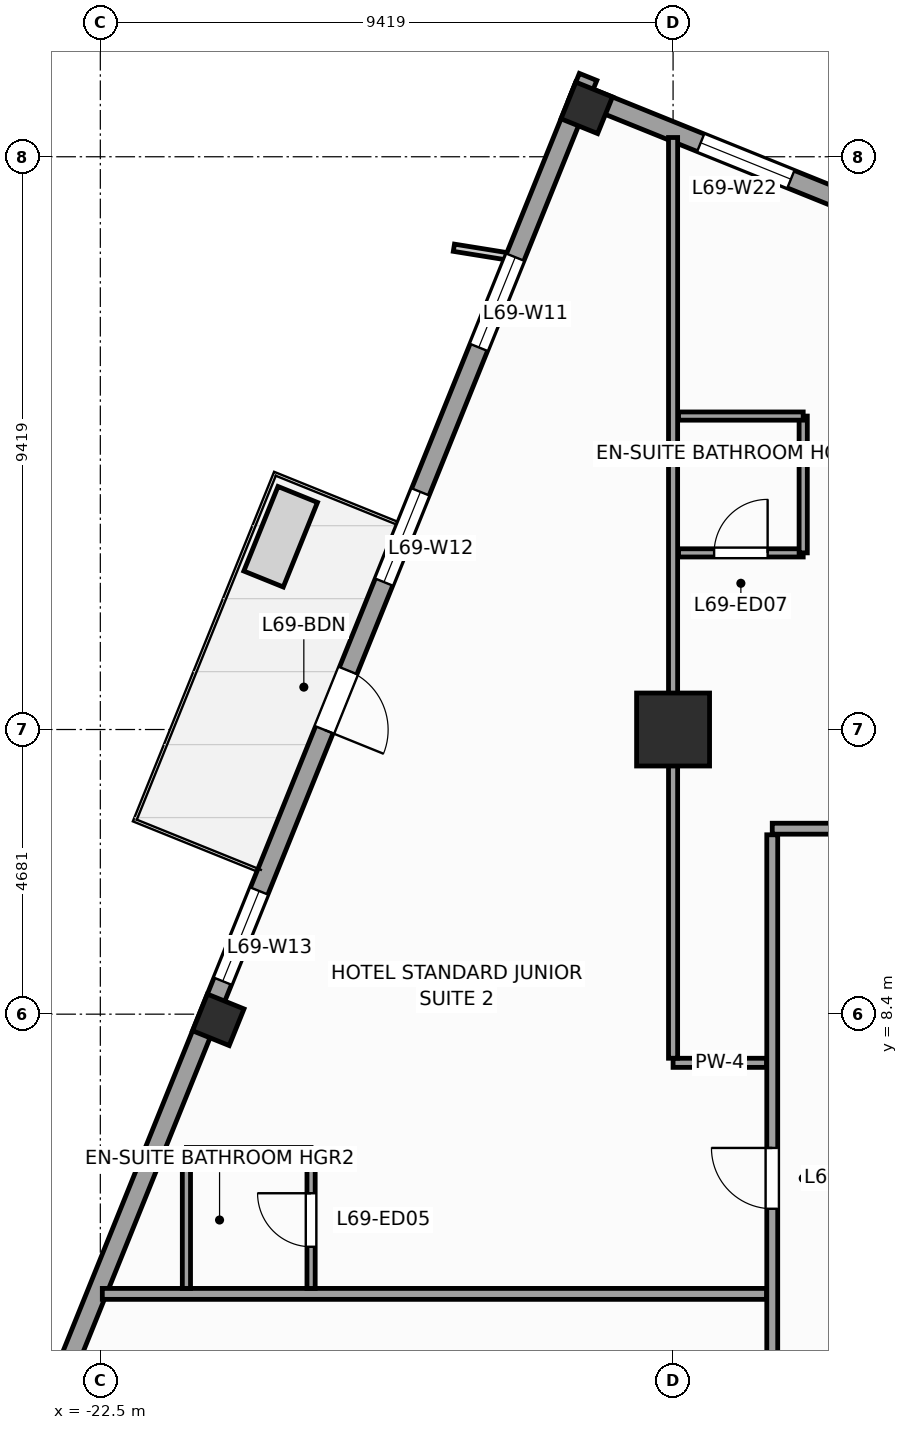
"""IFC4 building model, lengths in metres.
Left out: names, types, materials, properties, quantities, classifications, styles, units other than length and angle.
Written with IfcOpenShell. Run it as: python <this file> out.ifc"""

import sys

from ifc_helpers import new_model, si_unit, direction, frame, frame_2d, origin, origin_2d, place, context, subcontext, project, spatial, rectangle, extrude, source, transform, mapped, element, fill, save


model = new_model("IFC4")
c1 = context("Model", 3, precision=1e-05, world=origin(), true_north=direction((0.0, 1.0)))
c2 = subcontext(c1, "Body", "Model", "MODEL_VIEW")
j1 = project(units=[si_unit("LENGTHUNIT", "METRE"), si_unit("PLANEANGLEUNIT", "RADIAN")], contexts=[c1])
p1 = place(None, origin())
s1 = spatial("IfcSite", under=j1, at=p1, CompositionType="ELEMENT")
p2 = place(p1, origin())
s2 = spatial("IfcBuilding", under=s1, at=p2, CompositionType="ELEMENT")
p3 = place(p2, frame((0.0, 0.0, 283.2)))
s3 = spatial("IfcBuildingStorey", under=s2, at=p3, CompositionType="ELEMENT", Elevation=283.2)
m1 = source(origin(), c2, "Body", "SweptSolid", [
    extrude(rectangle(XDim=1.2, YDim=1.2, at=origin_2d()), origin(), (0.0, 0.0, 1.0), 3.6),
])
p4 = place(p3, frame((-13.081, 13.081, 0.0), z_axis=(0.0, 0.0, 1.0), x_axis=(1.0, 0.0, 0.0)))
e1 = element("IfcColumn", 1, at=p4, inside=s3, PredefinedType="COLUMN", context=c2, shape_type="MappedRepresentation", body=[
    mapped(m1, transform((0.0, 0.0, 0.0), scale=1.0)),
])
m2 = source(origin(), c2, "Body", "SweptSolid", [
    extrude(rectangle(XDim=0.65, YDim=0.65, at=origin_2d()), origin(), (0.0, 0.0, 1.0), 3.6),
])
for number, where, z_axis, x_axis in (
    (2, (-14.501, 23.304, 0.0), (0.0, 0.0, 1.0), (0.375, 0.927, 0.0)),
    (3, (-20.56, 8.307, 0.0), (0.0, 0.0, 1.0), (0.375, 0.927, 0.0)),
):
    element("IfcColumn", number, at=place(p3, frame(where, z_axis=z_axis, x_axis=x_axis)), inside=s3, PredefinedType="COLUMN", context=c2, shape_type="MappedRepresentation", body=[
        mapped(m2, transform((0.0, 0.0, 0.0), scale=1.0)),
    ])
p5 = place(p3, frame((-9.032, 21.278, 0.0), z_axis=(0.0, 0.0, 1.0), x_axis=(-0.927185411764, 0.374602739196, 0.0)))
e4 = element("IfcWall", 4, at=p5, inside=s3, PredefinedType="STANDARD", context=c2, shape_type="SweptSolid", body=[
    extrude(rectangle(XDim=6.155, YDim=0.31, at=frame_2d((3.078, 0.0))), origin(), (0.0, 0.0, 1.0), 3.35),
])
p6 = place(p5, frame((2.278, 0.0, 0.47)))
e5 = element("IfcOpeningElement", 5, at=p6, cuts=e4, PredefinedType="OPENING", context=c2, shape_type="SweptSolid", body=[
    extrude(rectangle(XDim=1.6, YDim=2.1, at=frame_2d((0.8, 1.05))), frame((0.0, 0.165, 0.0), z_axis=(0.0, -1.0, 0.0), x_axis=(1.0, 0.0, 0.0)), (0.0, 0.0, 1.0), 0.33),
])
p7 = place(p3, frame((-14.479, 23.813, 0.0), z_axis=(0.0, 0.0, 1.0), x_axis=(-0.374609557019, -0.927182657188, 0.0)))
e6 = element("IfcWall", 6, at=p7, inside=s3, PredefinedType="STANDARD", context=c2, shape_type="SweptSolid", body=[
    extrude(rectangle(XDim=33.31, YDim=0.31, at=frame_2d((16.655, 0.0))), origin(), (0.0, 0.0, 1.0), 2.75),
])
p8 = place(p7, frame((10.53, 0.0, 0.0)))
e7 = element("IfcOpeningElement", 7, at=p8, cuts=e6, PredefinedType="OPENING", context=c2, shape_type="SweptSolid", body=[
    extrude(rectangle(XDim=1.05, YDim=2.25, at=frame_2d((0.525, 1.125))), frame((0.0, 0.165, 0.0), z_axis=(0.0, -1.0, 0.0), x_axis=(1.0, 0.0, 0.0)), (0.0, 0.0, 1.0), 0.33),
])
p9 = place(p7, frame((3.197, 0.0, 0.47)))
e8 = element("IfcOpeningElement", 8, at=p9, cuts=e6, PredefinedType="OPENING", context=c2, shape_type="SweptSolid", body=[
    extrude(rectangle(XDim=1.6, YDim=2.1, at=frame_2d((0.8, 1.05))), frame((0.0, 0.165, 0.0), z_axis=(0.0, -1.0, 0.0), x_axis=(1.0, 0.0, 0.0)), (0.0, 0.0, 1.0), 0.33),
])
p10 = place(p7, frame((7.36, 0.0, 0.47)))
e9 = element("IfcOpeningElement", 9, at=p10, cuts=e6, PredefinedType="OPENING", context=c2, shape_type="SweptSolid", body=[
    extrude(rectangle(XDim=1.6, YDim=2.1, at=frame_2d((0.8, 1.05))), frame((0.0, 0.165, 0.0), z_axis=(0.0, -1.0, 0.0), x_axis=(1.0, 0.0, 0.0)), (0.0, 0.0, 1.0), 0.33),
])
p11 = place(p7, frame((14.439, 0.0, 0.47)))
e10 = element("IfcOpeningElement", 10, at=p11, cuts=e6, PredefinedType="OPENING", context=c2, shape_type="SweptSolid", body=[
    extrude(rectangle(XDim=1.6, YDim=2.1, at=frame_2d((0.8, 1.05))), frame((0.0, 0.165, 0.0), z_axis=(0.0, -1.0, 0.0), x_axis=(1.0, 0.0, 0.0)), (0.0, 0.0, 1.0), 0.33),
])
p12 = place(p7, frame((23.351, 0.0, 0.47)))
e11 = element("IfcOpeningElement", 11, at=p12, cuts=e6, PredefinedType="OPENING", context=c2, shape_type="SweptSolid", body=[
    extrude(rectangle(XDim=1.6, YDim=2.1, at=frame_2d((0.8, 1.05))), frame((0.0, 0.165, 0.0), z_axis=(0.0, -1.0, 0.0), x_axis=(1.0, 0.0, 0.0)), (0.0, 0.0, 1.0), 0.33),
])
p13 = place(p7, frame((30.097, 0.0, 0.47)))
e12 = element("IfcOpeningElement", 12, at=p13, cuts=e6, PredefinedType="OPENING", context=c2, shape_type="SweptSolid", body=[
    extrude(rectangle(XDim=1.6, YDim=2.1, at=frame_2d((0.8, 1.05))), frame((0.0, 0.165, 0.0), z_axis=(0.0, -1.0, 0.0), x_axis=(1.0, 0.0, 0.0)), (0.0, 0.0, 1.0), 0.33),
])
p14 = place(p7, frame((27.59, 0.0, 0.47)))
e13 = element("IfcOpeningElement", 13, at=p14, cuts=e6, PredefinedType="OPENING", context=c2, shape_type="SweptSolid", body=[
    extrude(rectangle(XDim=1.6, YDim=2.1, at=frame_2d((0.8, 1.05))), frame((0.0, 0.165, 0.0), z_axis=(0.0, -1.0, 0.0), x_axis=(1.0, 0.0, 0.0)), (0.0, 0.0, 1.0), 0.33),
])
p15 = place(p3, frame((-11.45, 11.45, 0.0), z_axis=(0.0, 0.0, 1.0), x_axis=(1.0, 0.0, 0.0)))
e14 = element("IfcWall", 14, at=p15, inside=s3, PredefinedType="PARTITIONING", context=c2, shape_type="SweptSolid", body=[
    extrude(rectangle(XDim=21.75, YDim=0.18, at=frame_2d((10.875, 0.0))), origin(), (0.0, 0.0, 1.0), 3.35),
])
p16 = place(p15, frame((2.639, 0.0, 0.0)))
e15 = element("IfcOpeningElement", 15, at=p16, cuts=e14, PredefinedType="OPENING", context=c2, shape_type="SweptSolid", body=[
    extrude(rectangle(XDim=1.0, YDim=2.15, at=frame_2d((0.5, 1.075))), frame((0.0, 0.1, 0.0), z_axis=(0.0, -1.0, 0.0), x_axis=(1.0, 0.0, 0.0)), (0.0, 0.0, 1.0), 0.2),
])
p17 = place(p15, frame((7.8, 0.0, 0.0)))
e16 = element("IfcOpeningElement", 16, at=p17, cuts=e14, PredefinedType="OPENING", context=c2, shape_type="SweptSolid", body=[
    extrude(rectangle(XDim=1.0, YDim=2.15, at=frame_2d((0.5, 1.075))), frame((0.0, 0.1, 0.0), z_axis=(0.0, -1.0, 0.0), x_axis=(1.0, 0.0, 0.0)), (0.0, 0.0, 1.0), 0.2),
])
p18 = place(p15, frame((12.65, 0.0, 0.0)))
e17 = element("IfcOpeningElement", 17, at=p18, cuts=e14, PredefinedType="OPENING", context=c2, shape_type="SweptSolid", body=[
    extrude(rectangle(XDim=1.0, YDim=2.15, at=frame_2d((0.5, 1.075))), frame((0.0, 0.1, 0.0), z_axis=(0.0, -1.0, 0.0), x_axis=(1.0, 0.0, 0.0)), (0.0, 0.0, 1.0), 0.2),
])
p19 = place(p15, frame((18.036, 0.0, 0.0)))
e18 = element("IfcOpeningElement", 18, at=p19, cuts=e14, PredefinedType="OPENING", context=c2, shape_type="SweptSolid", body=[
    extrude(rectangle(XDim=1.0, YDim=2.15, at=frame_2d((0.5, 1.075))), frame((0.0, 0.1, 0.0), z_axis=(0.0, -1.0, 0.0), x_axis=(1.0, 0.0, 0.0)), (0.0, 0.0, 1.0), 0.2),
])
p20 = place(p3, frame((-11.45, -12.35, 0.0), z_axis=(0.0, 0.0, 1.0), x_axis=(0.0, 1.0, 0.0)))
e19 = element("IfcWall", 19, at=p20, inside=s3, PredefinedType="PARTITIONING", context=c2, shape_type="SweptSolid", body=[
    extrude(rectangle(XDim=23.7, YDim=0.18, at=frame_2d((11.85, 0.0))), origin(), (0.0, 0.0, 1.0), 3.35),
])
p21 = place(p20, frame((13.75, 0.0, 0.0)))
e20 = element("IfcOpeningElement", 20, at=p21, cuts=e19, PredefinedType="OPENING", context=c2, shape_type="SweptSolid", body=[
    extrude(rectangle(XDim=1.0, YDim=2.15, at=frame_2d((0.5, 1.075))), frame((0.0, 0.1, 0.0), z_axis=(0.0, -1.0, 0.0), x_axis=(1.0, 0.0, 0.0)), (0.0, 0.0, 1.0), 0.2),
])
p22 = place(p20, frame((17.55, 0.0, 0.0)))
e21 = element("IfcOpeningElement", 21, at=p22, cuts=e19, PredefinedType="OPENING", context=c2, shape_type="SweptSolid", body=[
    extrude(rectangle(XDim=1.0, YDim=2.15, at=frame_2d((0.5, 1.075))), frame((0.0, 0.1, 0.0), z_axis=(0.0, -1.0, 0.0), x_axis=(1.0, 0.0, 0.0)), (0.0, 0.0, 1.0), 0.2),
])
p23 = place(p20, frame((6.15, 0.0, 0.0)))
e22 = element("IfcOpeningElement", 22, at=p23, cuts=e19, PredefinedType="OPENING", context=c2, shape_type="SweptSolid", body=[
    extrude(rectangle(XDim=1.0, YDim=2.15, at=frame_2d((0.5, 1.075))), frame((0.0, 0.1, 0.0), z_axis=(0.0, -1.0, 0.0), x_axis=(1.0, 0.0, 0.0)), (0.0, 0.0, 1.0), 0.2),
])
p24 = place(p20, frame((9.95, 0.0, 0.0)))
e23 = element("IfcOpeningElement", 23, at=p24, cuts=e19, PredefinedType="OPENING", context=c2, shape_type="SweptSolid", body=[
    extrude(rectangle(XDim=1.0, YDim=2.15, at=frame_2d((0.5, 1.075))), frame((0.0, 0.1, 0.0), z_axis=(0.0, -1.0, 0.0), x_axis=(1.0, 0.0, 0.0)), (0.0, 0.0, 1.0), 0.2),
])
p25 = place(p3, frame((-11.545, 3.8, 0.0), z_axis=(0.0, 0.0, 1.0), x_axis=(-1.0, 0.0, 0.0)))
e24 = element("IfcWall", 24, at=p25, inside=s3, PredefinedType="PARTITIONING", context=c2, shape_type="SweptSolid", body=[
    extrude(rectangle(XDim=10.923, YDim=0.18, at=frame_2d((5.461, 0.0))), origin(), (0.0, 0.0, 1.0), 3.35),
])
p26 = place(p3, frame((-11.545, 7.6, 0.0), z_axis=(0.0, 0.0, 1.0), x_axis=(-1.0, 0.0, 0.0)))
e25 = element("IfcWall", 25, at=p26, inside=s3, PredefinedType="PARTITIONING", context=c2, shape_type="SweptSolid", body=[
    extrude(rectangle(XDim=1.536, YDim=0.15, at=frame_2d((0.768, 0.0))), origin(), (0.0, 0.0, 1.0), 3.35),
])
p27 = place(p3, frame((-13.081, 7.675, 0.0), z_axis=(0.0, 0.0, 1.0), x_axis=(0.0, 1.0, 0.0)))
e26 = element("IfcWall", 26, at=p27, inside=s3, PredefinedType="PARTITIONING", context=c2, shape_type="SweptSolid", body=[
    extrude(rectangle(XDim=15.142, YDim=0.15, at=frame_2d((7.571, 0.0))), origin(), (0.0, 0.0, 1.0), 2.45),
])
p28 = place(p3, frame((-19.034, 3.89, 0.0), z_axis=(0.0, 0.0, 1.0), x_axis=(0.0, 1.0, 0.0)))
e27 = element("IfcWall", 27, at=p28, inside=s3, PredefinedType="PARTITIONING", context=c2, shape_type="SweptSolid", body=[
    extrude(rectangle(XDim=2.25, YDim=0.135, at=frame_2d((1.125, 0.0))), origin(), (0.0, 0.0, 1.0), 3.35),
])
p29 = place(p28, frame((0.685, 0.0, 0.0)))
e28 = element("IfcOpeningElement", 28, at=p29, cuts=e27, PredefinedType="OPENING", context=c2, shape_type="SweptSolid", body=[
    extrude(rectangle(XDim=0.88, YDim=2.1, at=frame_2d((0.44, 1.05))), frame((0.0, 0.078, 0.0), z_axis=(0.0, -1.0, 0.0), x_axis=(1.0, 0.0, 0.0)), (0.0, 0.0, 1.0), 0.155),
])
p30 = place(p3, frame((-21.084, 6.14, 0.0), z_axis=(0.0, 0.0, 1.0), x_axis=(1.0, 0.0, 0.0)))
e29 = element("IfcWall", 29, at=p30, inside=s3, PredefinedType="PARTITIONING", context=c2, shape_type="SweptSolid", body=[
    extrude(rectangle(XDim=2.05, YDim=0.135, at=frame_2d((1.025, 0.0))), origin(), (0.0, 0.0, 1.0), 3.35),
])
p31 = place(p3, frame((-21.084, 3.89, 0.0), z_axis=(0.0, 0.0, 1.0), x_axis=(0.0, 1.0, 0.0)))
e30 = element("IfcWall", 30, at=p31, inside=s3, PredefinedType="PARTITIONING", context=c2, shape_type="SweptSolid", body=[
    extrude(rectangle(XDim=2.25, YDim=0.135, at=frame_2d((1.125, 0.0))), origin(), (0.0, 0.0, 1.0), 3.35),
])
p32 = place(p3, frame((-12.991, 15.986, 0.0), z_axis=(0.0, 0.0, 1.0), x_axis=(1.0, 0.0, 0.0)))
e31 = element("IfcWall", 31, at=p32, inside=s3, PredefinedType="PARTITIONING", context=c2, shape_type="SweptSolid", body=[
    extrude(rectangle(XDim=2.05, YDim=0.135, at=frame_2d((1.025, 0.0))), origin(), (0.0, 0.0, 1.0), 3.35),
])
p33 = place(p32, frame((0.585, 0.0, 0.0)))
e32 = element("IfcOpeningElement", 32, at=p33, cuts=e31, PredefinedType="OPENING", context=c2, shape_type="SweptSolid", body=[
    extrude(rectangle(XDim=0.88, YDim=2.1, at=frame_2d((0.44, 1.05))), frame((0.0, 0.078, 0.0), z_axis=(0.0, -1.0, 0.0), x_axis=(1.0, 0.0, 0.0)), (0.0, 0.0, 1.0), 0.155),
])
p34 = place(p3, frame((-10.941, 15.986, 0.0), z_axis=(0.0, 0.0, 1.0), x_axis=(0.0, 1.0, 0.0)))
e33 = element("IfcWall", 33, at=p34, inside=s3, PredefinedType="PARTITIONING", context=c2, shape_type="SweptSolid", body=[
    extrude(rectangle(XDim=2.25, YDim=0.135, at=frame_2d((1.125, 0.0))), origin(), (0.0, 0.0, 1.0), 3.35),
])
p35 = place(p3, frame((-12.991, 18.236, 0.0), z_axis=(0.0, 0.0, 1.0), x_axis=(1.0, 0.0, 0.0)))
e34 = element("IfcWall", 34, at=p35, inside=s3, PredefinedType="PARTITIONING", context=c2, shape_type="SweptSolid", body=[
    extrude(rectangle(XDim=2.05, YDim=0.135, at=frame_2d((1.025, 0.0))), origin(), (0.0, 0.0, 1.0), 3.35),
])
m3 = source(origin(), c2, "Body", "SweptSolid", [
    extrude(rectangle(XDim=1.05, YDim=2.25, at=frame_2d((0.525, 1.125))), frame((0.0, 0.025, 0.0), z_axis=(0.0, -1.0, 0.0), x_axis=(1.0, 0.0, 0.0)), (0.0, 0.0, 1.0), 0.05),
])
p36 = place(p8, origin())
e35 = element("IfcDoor", 35, at=p36, inside=s3, OperationType="SINGLE_SWING_RIGHT", PredefinedType="DOOR", context=c2, shape_type="MappedRepresentation", body=[
    mapped(m3, transform((0.0, 0.0, 0.0), scale=1.0)),
])
fill(e7, e35)
m4 = source(origin(), c2, "Body", "SweptSolid", [
    extrude(rectangle(XDim=1.6, YDim=2.1, at=frame_2d((0.8, 1.05))), frame((0.0, 0.03, 0.0), z_axis=(0.0, -1.0, 0.0), x_axis=(1.0, 0.0, 0.0)), (0.0, 0.0, 1.0), 0.06),
])
p37 = place(p9, origin())
e36 = element("IfcWindow", 36, at=p37, inside=s3, PartitioningType="SINGLE_PANEL", PredefinedType="WINDOW", context=c2, shape_type="MappedRepresentation", body=[
    mapped(m4, transform((0.0, 0.0, 0.0), scale=1.0)),
])
fill(e8, e36)
p38 = place(p10, origin())
e37 = element("IfcWindow", 37, at=p38, inside=s3, PartitioningType="SINGLE_PANEL", PredefinedType="WINDOW", context=c2, shape_type="MappedRepresentation", body=[
    mapped(m4, transform((0.0, 0.0, 0.0), scale=1.0)),
])
fill(e9, e37)
p39 = place(p11, origin())
e38 = element("IfcWindow", 38, at=p39, inside=s3, PartitioningType="SINGLE_PANEL", PredefinedType="WINDOW", context=c2, shape_type="MappedRepresentation", body=[
    mapped(m4, transform((0.0, 0.0, 0.0), scale=1.0)),
])
fill(e10, e38)
p40 = place(p6, origin())
e39 = element("IfcWindow", 39, at=p40, inside=s3, PartitioningType="SINGLE_PANEL", PredefinedType="WINDOW", context=c2, shape_type="MappedRepresentation", body=[
    mapped(m4, transform((0.0, 0.0, 0.0), scale=1.0)),
])
fill(e5, e39)
m5 = source(origin(), c2, "Body", "SweptSolid", [
    extrude(rectangle(XDim=1.0, YDim=2.15, at=frame_2d((0.5, 1.075))), frame((0.0, 0.025, 0.0), z_axis=(0.0, -1.0, 0.0), x_axis=(1.0, 0.0, 0.0)), (0.0, 0.0, 1.0), 0.05),
])
p41 = place(p22, origin())
e40 = element("IfcDoor", 40, at=p41, inside=s3, OperationType="SINGLE_SWING_RIGHT", PredefinedType="DOOR", context=c2, shape_type="MappedRepresentation", body=[
    mapped(m5, transform((0.0, 0.0, 0.0), scale=1.0)),
])
fill(e21, e40)
m6 = source(origin(), c2, "Body", "SweptSolid", [
    extrude(rectangle(XDim=0.88, YDim=2.1, at=frame_2d((0.44, 1.05))), frame((0.0, 0.025, 0.0), z_axis=(0.0, -1.0, 0.0), x_axis=(1.0, 0.0, 0.0)), (0.0, 0.0, 1.0), 0.05),
])
p42 = place(p29, origin())
e41 = element("IfcDoor", 41, at=p42, inside=s3, OperationType="SINGLE_SWING_RIGHT", PredefinedType="DOOR", context=c2, shape_type="MappedRepresentation", body=[
    mapped(m6, transform((0.0, 0.0, 0.0), scale=1.0)),
])
fill(e28, e41)
p43 = place(p33, origin())
e42 = element("IfcDoor", 42, at=p43, inside=s3, OperationType="SINGLE_SWING_RIGHT", PredefinedType="DOOR", context=c2, shape_type="MappedRepresentation", body=[
    mapped(m6, transform((0.0, 0.0, 0.0), scale=1.0)),
])
fill(e32, e42)
save(model, sys.argv[1])
